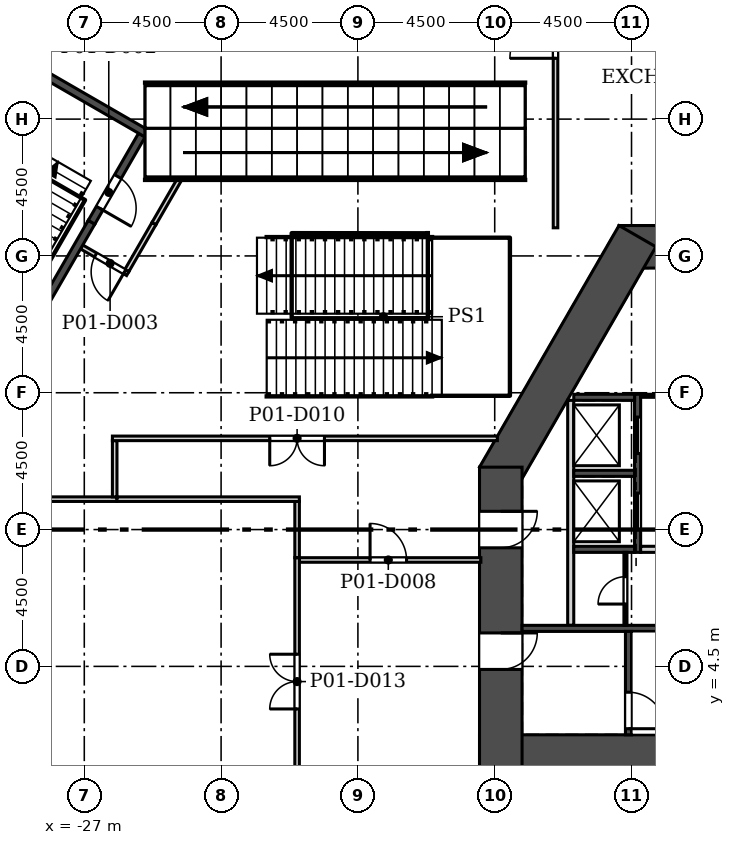
"""IFC4 building model, lengths in metres.
Left out: names, types, materials, properties, quantities, classifications, styles, units other than length and angle.
Written with IfcOpenShell. Run it as: python <this file> out.ifc"""

import sys

from ifc_helpers import new_model, si_unit, direction, frame, frame_2d, origin, place, context, subcontext, project, spatial, rectangle, extrude, element, fill, save


model = new_model("IFC4")
c1 = context("Model", 3, precision=1e-05, world=origin(), true_north=direction((0.0, 1.0)))
c2 = subcontext(c1, "Body", "Model", "MODEL_VIEW")
j1 = project(units=[si_unit("LENGTHUNIT", "METRE"), si_unit("PLANEANGLEUNIT", "RADIAN")], contexts=[c1])
p1 = place(None, origin())
s1 = spatial("IfcSite", under=j1, at=p1, CompositionType="ELEMENT")
p2 = place(p1, origin())
s2 = spatial("IfcBuilding", under=s1, at=p2, CompositionType="ELEMENT")
p3 = place(p2, frame((0.0, 0.0, 8.0)))
s3 = spatial("IfcBuildingStorey", under=s2, at=p3, CompositionType="ELEMENT", Elevation=8.0)
p4 = place(p3, frame((-14.0, 1.55, 0.0), z_axis=(0.0, 0.0, 1.0), x_axis=(1.0, 0.0, 0.0)))
e1 = element("IfcWall", 1, at=p4, inside=s3, PredefinedType="SHEAR", context=c2, shape_type="SweptSolid", body=[
    extrude(rectangle(XDim=28.0, YDim=1.4, at=frame_2d((14.0, 0.0))), origin(), (0.0, 0.0, 1.0), 6.0),
])
p5 = place(p3, frame((9.412, 18.3, 0.0), z_axis=(0.0, 0.0, 1.0), x_axis=(-1.0, 0.0, 0.0)))
e2 = element("IfcWall", 2, at=p5, inside=s3, PredefinedType="SHEAR", context=c2, shape_type="SweptSolid", body=[
    extrude(rectangle(XDim=18.823, YDim=1.4, at=frame_2d((9.412, 0.0))), origin(), (0.0, 0.0, 1.0), 6.0),
])
p6 = place(p5, frame((8.711, 0.0, 0.0)))
e3 = element("IfcOpeningElement", 3, at=p6, cuts=e2, PredefinedType="OPENING", context=c2, shape_type="SweptSolid", body=[
    extrude(rectangle(XDim=1.4, YDim=2.1, at=frame_2d((0.7, 1.05))), frame((0.0, 0.71, 0.0), z_axis=(0.0, -1.0, 0.0), x_axis=(1.0, 0.0, 0.0)), (0.0, 0.0, 1.0), 1.42),
])
p7 = place(p5, frame((11.412, 0.0, 0.0)))
e4 = element("IfcOpeningElement", 4, at=p7, cuts=e2, PredefinedType="OPENING", context=c2, shape_type="SweptSolid", body=[
    extrude(rectangle(XDim=6.0, YDim=2.4, at=frame_2d((3.0, 1.2))), frame((0.0, 0.71, 0.0), z_axis=(0.0, -1.0, 0.0), x_axis=(1.0, 0.0, 0.0)), (0.0, 0.0, 1.0), 1.42),
])
p8 = place(p5, frame((1.412, 0.0, 0.0)))
e5 = element("IfcOpeningElement", 5, at=p8, cuts=e2, PredefinedType="OPENING", context=c2, shape_type="SweptSolid", body=[
    extrude(rectangle(XDim=6.0, YDim=2.4, at=frame_2d((3.0, 1.2))), frame((0.0, 0.71, 0.0), z_axis=(0.0, -1.0, 0.0), x_axis=(1.0, 0.0, 0.0)), (0.0, 0.0, 1.0), 1.42),
])
p9 = place(p3, frame((-8.805, 18.65, 0.0), z_axis=(0.0, 0.0, 1.0), x_axis=(-0.50000187635, -0.866024320471, 0.0)))
e6 = element("IfcWall", 6, at=p9, inside=s3, PredefinedType="SHEAR", context=c2, shape_type="SweptSolid", body=[
    extrude(rectangle(XDim=9.177, YDim=1.4, at=frame_2d((4.588, 0.0))), origin(), (0.0, 0.0, 1.0), 6.0),
])
p10 = place(p3, frame((-13.3, 11.052, 0.0), z_axis=(0.0, 0.0, 1.0), x_axis=(0.0, -1.0, 0.0)))
e7 = element("IfcWall", 7, at=p10, inside=s3, PredefinedType="SHEAR", context=c2, shape_type="SweptSolid", body=[
    extrude(rectangle(XDim=10.202, YDim=1.4, at=frame_2d((5.101, 0.0))), origin(), (0.0, 0.0, 1.0), 6.0),
])
p11 = place(p10, frame((5.453, 0.0, 0.0)))
e8 = element("IfcOpeningElement", 8, at=p11, cuts=e7, PredefinedType="OPENING", context=c2, shape_type="SweptSolid", body=[
    extrude(rectangle(XDim=1.2, YDim=2.1, at=frame_2d((0.6, 1.05))), frame((0.0, 0.71, 0.0), z_axis=(0.0, -1.0, 0.0), x_axis=(1.0, 0.0, 0.0)), (0.0, 0.0, 1.0), 1.42),
])
p12 = place(p10, frame((1.453, 0.0, 0.0)))
e9 = element("IfcOpeningElement", 9, at=p12, cuts=e7, PredefinedType="OPENING", context=c2, shape_type="SweptSolid", body=[
    extrude(rectangle(XDim=1.2, YDim=2.1, at=frame_2d((0.6, 1.05))), frame((0.0, 0.71, 0.0), z_axis=(0.0, -1.0, 0.0), x_axis=(1.0, 0.0, 0.0)), (0.0, 0.0, 1.0), 1.42),
])
p13 = place(p3, frame((-11.0, 5.85, 0.0), z_axis=(0.0, 0.0, 1.0), x_axis=(0.0, 1.0, 0.0)))
e10 = element("IfcWall", 10, at=p13, inside=s3, PredefinedType="SOLIDWALL", context=c2, shape_type="SweptSolid", body=[
    extrude(rectangle(XDim=7.4, YDim=0.2, at=frame_2d((3.7, 0.0))), origin(), (0.0, 0.0, 1.0), 5.7),
])
p14 = place(p3, frame((-8.8, 8.25, -0.3), z_axis=(0.0, 0.0, 1.0), x_axis=(0.0, 1.0, 0.0)))
e11 = element("IfcWall", 11, at=p14, inside=s3, PredefinedType="SOLIDWALL", context=c2, shape_type="SweptSolid", body=[
    extrude(rectangle(XDim=5.2, YDim=0.2, at=frame_2d((2.6, 0.0))), origin(), (0.0, 0.0, 1.0), 6.0),
])
p15 = place(p14, frame((0.75, 0.0, 0.3)))
e12 = element("IfcOpeningElement", 12, at=p15, cuts=e11, PredefinedType="OPENING", context=c2, shape_type="SweptSolid", body=[
    extrude(rectangle(XDim=1.2, YDim=2.1, at=frame_2d((0.6, 1.05))), frame((0.0, 0.11, 0.0), z_axis=(0.0, -1.0, 0.0), x_axis=(1.0, 0.0, 0.0)), (0.0, 0.0, 1.0), 0.22),
])
p16 = place(p14, frame((3.25, 0.0, 0.3)))
e13 = element("IfcOpeningElement", 13, at=p16, cuts=e11, PredefinedType="OPENING", context=c2, shape_type="SweptSolid", body=[
    extrude(rectangle(XDim=1.2, YDim=2.1, at=frame_2d((0.6, 1.05))), frame((0.0, 0.11, 0.0), z_axis=(0.0, -1.0, 0.0), x_axis=(1.0, 0.0, 0.0)), (0.0, 0.0, 1.0), 0.22),
])
p17 = place(p3, frame((-10.9, 8.35, -0.3), z_axis=(0.0, 0.0, 1.0), x_axis=(1.0, 0.0, 0.0)))
e14 = element("IfcWall", 14, at=p17, inside=s3, PredefinedType="SOLIDWALL", context=c2, shape_type="SweptSolid", body=[
    extrude(rectangle(XDim=2.0, YDim=0.2, at=frame_2d((1.0, 0.0))), origin(), (0.0, 0.0, 1.0), 6.0),
])
p18 = place(p3, frame((-12.6, 5.75, -0.3), z_axis=(0.0, 0.0, 1.0), x_axis=(1.0, 0.0, 0.0)))
e15 = element("IfcWall", 15, at=p18, inside=s3, PredefinedType="SOLIDWALL", context=c2, shape_type="SweptSolid", body=[
    extrude(rectangle(XDim=11.4, YDim=0.2, at=frame_2d((5.7, 0.0))), origin(), (0.0, 0.0, 1.0), 6.0),
])
p19 = place(p3, frame((-9.1, 2.25, -0.3), z_axis=(0.0, 0.0, 1.0), x_axis=(0.0, 1.0, 0.0)))
e16 = element("IfcWall", 16, at=p19, inside=s3, PredefinedType="SOLIDWALL", context=c2, shape_type="SweptSolid", body=[
    extrude(rectangle(XDim=3.4, YDim=0.2, at=frame_2d((1.7, 0.0))), origin(), (0.0, 0.0, 1.0), 6.0),
])
p20 = place(p19, frame((0.2, 0.0, 0.3)))
e17 = element("IfcOpeningElement", 17, at=p20, cuts=e16, PredefinedType="OPENING", context=c2, shape_type="SweptSolid", body=[
    extrude(rectangle(XDim=1.2, YDim=2.1, at=frame_2d((0.6, 1.05))), frame((0.0, 0.11, 0.0), z_axis=(0.0, -1.0, 0.0), x_axis=(1.0, 0.0, 0.0)), (0.0, 0.0, 1.0), 0.22),
])
for number, where, z_axis, x_axis in (
    (18, (-10.9, 10.85, -0.3), (0.0, 0.0, 1.0), (1.0, 0.0, 0.0)),
    (19, (-10.9, 13.35, -0.3), (0.0, 0.0, 1.0), (1.0, 0.0, 0.0)),
):
    element("IfcWall", number, at=place(p3, frame(where, z_axis=z_axis, x_axis=x_axis)), inside=s3, PredefinedType="SOLIDWALL", context=c2, shape_type="SweptSolid", body=[
        extrude(rectangle(XDim=2.0, YDim=0.2, at=frame_2d((1.0, 0.0))), origin(), (0.0, 0.0, 1.0), 6.0),
    ])
p21 = place(p3, frame((-8.7, 13.4, 0.0), z_axis=(0.0, 0.0, 1.0), x_axis=(1.0, 0.0, 0.0)))
e20 = element("IfcWall", 20, at=p21, inside=s3, PredefinedType="PARTITIONING", context=c2, shape_type="SweptSolid", body=[
    extrude(rectangle(XDim=2.8, YDim=0.1, at=frame_2d((1.4, 0.0))), origin(), (0.0, 0.0, 1.0), 5.7),
])
p22 = place(p21, frame((0.7, 0.0, 0.0)))
e21 = element("IfcOpeningElement", 21, at=p22, cuts=e20, PredefinedType="OPENING", context=c2, shape_type="SweptSolid", body=[
    extrude(rectangle(XDim=1.4, YDim=2.1, at=frame_2d((0.7, 1.05))), frame((0.0, 0.06, 0.0), z_axis=(0.0, -1.0, 0.0), x_axis=(1.0, 0.0, 0.0)), (0.0, 0.0, 1.0), 0.12),
])
p23 = place(p3, frame((-9.2, 5.85, 0.0), z_axis=(0.0, 0.0, 1.0), x_axis=(0.0, 1.0, 0.0)))
e22 = element("IfcWall", 22, at=p23, inside=s3, PredefinedType="PARTITIONING", context=c2, shape_type="SweptSolid", body=[
    extrude(rectangle(XDim=2.4, YDim=0.1, at=frame_2d((1.2, 0.0))), origin(), (0.0, 0.0, 1.0), 5.7),
])
p24 = place(p23, frame((0.7, 0.0, 0.0)))
e23 = element("IfcOpeningElement", 23, at=p24, cuts=e22, PredefinedType="OPENING", context=c2, shape_type="SweptSolid", body=[
    extrude(rectangle(XDim=0.9, YDim=2.1, at=frame_2d((0.45, 1.05))), frame((0.0, 0.06, 0.0), z_axis=(0.0, -1.0, 0.0), x_axis=(1.0, 0.0, 0.0)), (0.0, 0.0, 1.0), 0.12),
])
p25 = place(p3, frame((-8.7, 8.35, 0.0), z_axis=(0.0, 0.0, 1.0), x_axis=(1.0, 0.0, 0.0)))
e24 = element("IfcWall", 24, at=p25, inside=s3, PredefinedType="SOLIDWALL", context=c2, shape_type="SweptSolid", body=[
    extrude(rectangle(XDim=2.8, YDim=0.2, at=frame_2d((1.4, 0.0))), origin(), (0.0, 0.0, 1.0), 5.7),
])
p26 = place(p25, frame((0.9, 0.0, 0.0)))
e25 = element("IfcOpeningElement", 25, at=p26, cuts=e24, PredefinedType="OPENING", context=c2, shape_type="SweptSolid", body=[
    extrude(rectangle(XDim=1.0, YDim=2.1, at=frame_2d((0.5, 1.05))), frame((0.0, 0.11, 0.0), z_axis=(0.0, -1.0, 0.0), x_axis=(1.0, 0.0, 0.0)), (0.0, 0.0, 1.0), 0.22),
])
p27 = place(p3, frame((-19.925, 8.0, 0.0), z_axis=(0.0, 0.0, 1.0), x_axis=(1.0, 0.0, 0.0)))
e26 = element("IfcWall", 26, at=p27, inside=s3, PredefinedType="PARTITIONING", context=c2, shape_type="SweptSolid", body=[
    extrude(rectangle(XDim=5.97, YDim=0.15, at=frame_2d((2.985, 0.0))), origin(), (0.0, 0.0, 1.0), 5.7),
])
p28 = place(p27, frame((2.325, 0.0, 0.0)))
e27 = element("IfcOpeningElement", 27, at=p28, cuts=e26, PredefinedType="OPENING", context=c2, shape_type="SweptSolid", body=[
    extrude(rectangle(XDim=1.2, YDim=2.1, at=frame_2d((0.6, 1.05))), frame((0.0, 0.085, 0.0), z_axis=(0.0, -1.0, 0.0), x_axis=(1.0, 0.0, 0.0)), (0.0, 0.0, 1.0), 0.17),
])
p29 = place(p3, frame((-20.0, 8.075, 0.0), z_axis=(0.0, 0.0, 1.0), x_axis=(0.0, -1.0, 0.0)))
e28 = element("IfcWall", 28, at=p29, inside=s3, PredefinedType="PARTITIONING", context=c2, shape_type="SweptSolid", body=[
    extrude(rectangle(XDim=7.78, YDim=0.15, at=frame_2d((3.89, 0.0))), origin(), (0.0, 0.0, 1.0), 5.7),
])
p30 = place(p29, frame((3.175, 0.0, 0.0)))
e29 = element("IfcOpeningElement", 29, at=p30, cuts=e28, PredefinedType="OPENING", context=c2, shape_type="SweptSolid", body=[
    extrude(rectangle(XDim=1.8, YDim=2.1, at=frame_2d((0.9, 1.05))), frame((0.0, 0.085, 0.0), z_axis=(0.0, -1.0, 0.0), x_axis=(1.0, 0.0, 0.0)), (0.0, 0.0, 1.0), 0.17),
])
p31 = place(p3, frame((-20.0, 9.925, 0.0), z_axis=(0.0, 0.0, 1.0), x_axis=(0.0, -1.0, 0.0)))
e30 = element("IfcWall", 30, at=p31, inside=s3, PredefinedType="PARTITIONING", context=c2, shape_type="SweptSolid", body=[
    extrude(rectangle(XDim=1.85, YDim=0.15, at=frame_2d((0.925, 0.0))), origin(), (0.0, 0.0, 1.0), 5.7),
])
p32 = place(p3, frame((-41.944, 10.0, 0.0), z_axis=(0.0, 0.0, 1.0), x_axis=(1.0, 0.0, 0.0)))
e31 = element("IfcWall", 31, at=p32, inside=s3, PredefinedType="PARTITIONING", context=c2, shape_type="SweptSolid", body=[
    extrude(rectangle(XDim=16.019, YDim=0.15, at=frame_2d((8.009, 0.0))), origin(), (0.0, 0.0, 1.0), 5.7),
])
p33 = place(p32, frame((3.044, 0.0, 0.0)))
e32 = element("IfcOpeningElement", 32, at=p33, cuts=e31, PredefinedType="OPENING", context=c2, shape_type="SweptSolid", body=[
    extrude(rectangle(XDim=1.8, YDim=2.1, at=frame_2d((0.9, 1.05))), frame((0.0, 0.085, 0.0), z_axis=(0.0, -1.0, 0.0), x_axis=(1.0, 0.0, 0.0)), (0.0, 0.0, 1.0), 0.17),
])
p34 = place(p3, frame((-25.925, 10.0, 0.0), z_axis=(0.0, 0.0, 1.0), x_axis=(1.0, 0.0, 0.0)))
e33 = element("IfcWall", 33, at=p34, inside=s3, PredefinedType="PARTITIONING", context=c2, shape_type="SweptSolid", body=[
    extrude(rectangle(XDim=6.0, YDim=0.15, at=frame_2d((3.0, 0.0))), origin(), (0.0, 0.0, 1.0), 5.7),
])
p35 = place(p3, frame((-26.0, 10.075, 0.0), z_axis=(0.0, 0.0, 1.0), x_axis=(0.0, 1.0, 0.0)))
e34 = element("IfcWall", 34, at=p35, inside=s3, PredefinedType="PARTITIONING", context=c2, shape_type="SweptSolid", body=[
    extrude(rectangle(XDim=1.85, YDim=0.15, at=frame_2d((0.925, 0.0))), origin(), (0.0, 0.0, 1.0), 5.7),
])
p36 = place(p3, frame((-26.075, 12.0, 0.0), z_axis=(0.0, 0.0, 1.0), x_axis=(1.0, 0.0, 0.0)))
e35 = element("IfcWall", 35, at=p36, inside=s3, PredefinedType="PARTITIONING", context=c2, shape_type="SweptSolid", body=[
    extrude(rectangle(XDim=12.662, YDim=0.15, at=frame_2d((6.331, 0.0))), origin(), (0.0, 0.0, 1.0), 5.7),
])
p37 = place(p36, frame((5.175, 0.0, 0.0)))
e36 = element("IfcOpeningElement", 36, at=p37, cuts=e35, PredefinedType="OPENING", context=c2, shape_type="SweptSolid", body=[
    extrude(rectangle(XDim=1.8, YDim=2.1, at=frame_2d((0.9, 1.05))), frame((0.0, 0.085, 0.0), z_axis=(0.0, -1.0, 0.0), x_axis=(1.0, 0.0, 0.0)), (0.0, 0.0, 1.0), 0.17),
])
p38 = place(p3, frame((-25.571, 17.419, 0.0), z_axis=(0.0, 0.0, 1.0), x_axis=(-0.866046247233, 0.49996389635, 0.0)))
e37 = element("IfcWall", 37, at=p38, inside=s3, PredefinedType="PARTITIONING", context=c2, shape_type="SweptSolid", body=[
    extrude(rectangle(XDim=1.751, YDim=0.15, at=frame_2d((0.875, 0.0))), origin(), (0.0, 0.0, 1.0), 5.7),
])
p39 = place(p38, frame((0.12, 0.0, 0.0)))
e38 = element("IfcOpeningElement", 38, at=p39, cuts=e37, PredefinedType="OPENING", context=c2, shape_type="SweptSolid", body=[
    extrude(rectangle(XDim=1.1, YDim=2.1, at=frame_2d((0.55, 1.05))), frame((0.0, 0.085, 0.0), z_axis=(0.0, -1.0, 0.0), x_axis=(1.0, 0.0, 0.0)), (0.0, 0.0, 1.0), 0.17),
])
p40 = place(p3, frame((-24.707, 19.065, 0.0), z_axis=(0.0, 0.0, 1.0), x_axis=(-0.500058459303, -0.865991649659, 0.0)))
e39 = element("IfcWall", 39, at=p40, inside=s3, PredefinedType="PARTITIONING", context=c2, shape_type="SweptSolid", body=[
    extrude(rectangle(XDim=1.782, YDim=0.15, at=frame_2d((0.891, 0.0))), origin(), (0.0, 0.0, 1.0), 5.7),
])
p41 = place(p3, frame((-26.761, 19.108, 0.0), z_axis=(0.0, 0.0, 1.0), x_axis=(-0.499979843709, -0.866037040711, 0.0)))
e40 = element("IfcWall", 40, at=p41, inside=s3, PredefinedType="SOLIDWALL", context=c2, shape_type="SweptSolid", body=[
    extrude(rectangle(XDim=8.293, YDim=0.25, at=frame_2d((4.146, 0.0))), origin(), (0.0, 0.0, 1.0), 5.7),
])
p42 = place(p3, frame((-23.841, 20.565, 0.0), z_axis=(0.0, 0.0, 1.0), x_axis=(-0.500019299785, -0.866014260761, 0.0)))
e41 = element("IfcWall", 41, at=p42, inside=s3, PredefinedType="PARTITIONING", context=c2, shape_type="SweptSolid", body=[
    extrude(rectangle(XDim=1.732, YDim=0.15, at=frame_2d((0.866, 0.0))), origin(), (0.0, 0.0, 1.0), 5.7),
])
p43 = place(p3, frame((-25.107, 21.972, 0.0), z_axis=(0.0, 0.0, 1.0), x_axis=(-0.500005757777, -0.866022079505, 0.0)))
e42 = element("IfcWall", 42, at=p43, inside=s3, PredefinedType="SOLIDWALL", context=c2, shape_type="SweptSolid", body=[
    extrude(rectangle(XDim=3.307, YDim=0.25, at=frame_2d((1.654, 0.0))), origin(), (0.0, 0.0, 1.0), 5.7),
])
p44 = place(p43, frame((1.575, 0.0, 0.0)))
e43 = element("IfcOpeningElement", 43, at=p44, cuts=e42, PredefinedType="OPENING", context=c2, shape_type="SweptSolid", body=[
    extrude(rectangle(XDim=1.2, YDim=2.1, at=frame_2d((0.6, 1.05))), frame((0.0, 0.135, 0.0), z_axis=(0.0, -1.0, 0.0), x_axis=(1.0, 0.0, 0.0)), (0.0, 0.0, 1.0), 0.27),
])
p45 = place(p3, frame((-30.652, 25.318, 0.0), z_axis=(0.0, 0.0, 1.0), x_axis=(0.866040211805, -0.499974350878, 0.0)))
e44 = element("IfcWall", 44, at=p45, inside=s3, PredefinedType="SOLIDWALL", context=c2, shape_type="SweptSolid", body=[
    extrude(rectangle(XDim=6.6, YDim=0.25, at=frame_2d((3.3, 0.0))), origin(), (0.0, 0.0, 1.0), 5.7),
])
p46 = place(p3, frame((-11.5, 28.835, 0.0), z_axis=(0.0, 0.0, 1.0), x_axis=(0.0, -1.0, 0.0)))
e45 = element("IfcWall", 45, at=p46, inside=s3, PredefinedType="PARTITIONING", context=c2, shape_type="SweptSolid", body=[
    extrude(rectangle(XDim=9.91, YDim=0.15, at=frame_2d((4.955, 0.0))), origin(), (0.0, 0.0, 1.0), 5.7),
])
p47 = place(p46, frame((1.335, 0.0, 0.0)))
e46 = element("IfcOpeningElement", 46, at=p47, cuts=e45, PredefinedType="OPENING", context=c2, shape_type="SweptSolid", body=[
    extrude(rectangle(XDim=3.0, YDim=2.4, at=frame_2d((1.5, 1.2))), frame((0.0, 0.085, 0.0), z_axis=(0.0, -1.0, 0.0), x_axis=(1.0, 0.0, 0.0)), (0.0, 0.0, 1.0), 0.17),
])
p48 = place(p3, frame((-13.125, 13.45, 0.0), z_axis=(0.0, 0.0, 1.0), x_axis=(0.0, 1.0, 0.0)))
e47 = element("IfcWall", 47, at=p48, inside=s3, PredefinedType="SOLIDWALL", context=c2, shape_type="SweptSolid", body=[
    extrude(rectangle(XDim=5.1, YDim=0.25, at=frame_2d((2.55, 0.0))), origin(), (0.0, 0.0, 1.0), 5.7),
])
for number, where, z_axis, x_axis in (
    (48, (-13.125, 13.525, 0.0), (0.0, 0.0, 1.0), (-1.0, 0.0, 0.0)),
    (49, (-13.125, 18.475, 0.0), (0.0, 0.0, 1.0), (-1.0, 0.0, 0.0)),
):
    element("IfcWall", number, at=place(p3, frame(where, z_axis=z_axis, x_axis=x_axis)), inside=s3, PredefinedType="SOLIDWALL", context=c2, shape_type="SweptSolid", body=[
        extrude(rectangle(XDim=2.31, YDim=0.25, at=frame_2d((1.155, 0.0))), origin(), (0.0, 0.0, 1.0), 5.7),
    ])
p49 = place(p15, origin())
e50 = element("IfcDoor", 50, at=p49, inside=s3, OperationType="SLIDING_TO_LEFT", PredefinedType="DOOR", context=c2, shape_type="SweptSolid", body=[
    extrude(rectangle(XDim=1.2, YDim=2.1, at=frame_2d((0.6, 1.05))), frame((0.0, 0.025, 0.0), z_axis=(0.0, -1.0, 0.0), x_axis=(1.0, 0.0, 0.0)), (0.0, 0.0, 1.0), 0.05),
])
fill(e12, e50)
p50 = place(p16, origin())
e51 = element("IfcDoor", 51, at=p50, inside=s3, OperationType="SLIDING_TO_LEFT", PredefinedType="DOOR", context=c2, shape_type="SweptSolid", body=[
    extrude(rectangle(XDim=1.2, YDim=2.1, at=frame_2d((0.6, 1.05))), frame((0.0, 0.025, 0.0), z_axis=(0.0, -1.0, 0.0), x_axis=(1.0, 0.0, 0.0)), (0.0, 0.0, 1.0), 0.05),
])
fill(e13, e51)
p51 = place(p24, origin())
e52 = element("IfcDoor", 52, at=p51, inside=s3, OperationType="SINGLE_SWING_LEFT", PredefinedType="DOOR", context=c2, shape_type="SweptSolid", body=[
    extrude(rectangle(XDim=0.9, YDim=2.1, at=frame_2d((0.45, 1.05))), frame((0.0, 0.025, 0.0), z_axis=(0.0, -1.0, 0.0), x_axis=(1.0, 0.0, 0.0)), (0.0, 0.0, 1.0), 0.05),
])
fill(e23, e52)
p52 = place(p11, origin())
e53 = element("IfcDoor", 53, at=p52, inside=s3, OperationType="SINGLE_SWING_LEFT", PredefinedType="DOOR", context=c2, shape_type="SweptSolid", body=[
    extrude(rectangle(XDim=1.2, YDim=2.1, at=frame_2d((0.6, 1.05))), frame((0.0, 0.025, 0.0), z_axis=(0.0, -1.0, 0.0), x_axis=(1.0, 0.0, 0.0)), (0.0, 0.0, 1.0), 0.05),
])
fill(e8, e53)
p53 = place(p20, frame((1.2, 0.0, 0.0), z_axis=(0.0, 0.0, 1.0), x_axis=(-1.0, 0.0, 0.0)))
e54 = element("IfcDoor", 54, at=p53, inside=s3, OperationType="SINGLE_SWING_RIGHT", PredefinedType="DOOR", context=c2, shape_type="SweptSolid", body=[
    extrude(rectangle(XDim=1.2, YDim=2.1, at=frame_2d((0.6, 1.05))), frame((0.0, 0.025, 0.0), z_axis=(0.0, -1.0, 0.0), x_axis=(1.0, 0.0, 0.0)), (0.0, 0.0, 1.0), 0.05),
])
fill(e17, e54)
p54 = place(p12, origin())
e55 = element("IfcDoor", 55, at=p54, inside=s3, OperationType="SINGLE_SWING_LEFT", PredefinedType="DOOR", context=c2, shape_type="SweptSolid", body=[
    extrude(rectangle(XDim=1.2, YDim=2.1, at=frame_2d((0.6, 1.05))), frame((0.0, 0.025, 0.0), z_axis=(0.0, -1.0, 0.0), x_axis=(1.0, 0.0, 0.0)), (0.0, 0.0, 1.0), 0.05),
])
fill(e9, e55)
p55 = place(p44, origin())
e56 = element("IfcDoor", 56, at=p55, inside=s3, OperationType="SINGLE_SWING_RIGHT", PredefinedType="DOOR", context=c2, shape_type="SweptSolid", body=[
    extrude(rectangle(XDim=1.2, YDim=2.1, at=frame_2d((0.6, 1.05))), frame((0.0, 0.025, 0.0), z_axis=(0.0, -1.0, 0.0), x_axis=(1.0, 0.0, 0.0)), (0.0, 0.0, 1.0), 0.05),
])
fill(e43, e56)
p56 = place(p39, origin())
e57 = element("IfcDoor", 57, at=p56, inside=s3, OperationType="SINGLE_SWING_LEFT", PredefinedType="DOOR", context=c2, shape_type="SweptSolid", body=[
    extrude(rectangle(XDim=1.1, YDim=2.1, at=frame_2d((0.55, 1.05))), frame((0.0, 0.025, 0.0), z_axis=(0.0, -1.0, 0.0), x_axis=(1.0, 0.0, 0.0)), (0.0, 0.0, 1.0), 0.05),
])
fill(e38, e57)
p57 = place(p28, origin())
e58 = element("IfcDoor", 58, at=p57, inside=s3, OperationType="SINGLE_SWING_LEFT", PredefinedType="DOOR", context=c2, shape_type="SweptSolid", body=[
    extrude(rectangle(XDim=1.2, YDim=2.1, at=frame_2d((0.6, 1.05))), frame((0.0, 0.025, 0.0), z_axis=(0.0, -1.0, 0.0), x_axis=(1.0, 0.0, 0.0)), (0.0, 0.0, 1.0), 0.05),
])
fill(e27, e58)
p58 = place(p37, frame((1.8, 0.0, 0.0), z_axis=(0.0, 0.0, 1.0), x_axis=(-1.0, 0.0, 0.0)))
e59 = element("IfcDoor", 59, at=p58, inside=s3, OperationType="DOUBLE_DOOR_SINGLE_SWING", PredefinedType="DOOR", context=c2, shape_type="SweptSolid", body=[
    extrude(rectangle(XDim=1.8, YDim=2.1, at=frame_2d((0.9, 1.05))), frame((0.0, 0.025, 0.0), z_axis=(0.0, -1.0, 0.0), x_axis=(1.0, 0.0, 0.0)), (0.0, 0.0, 1.0), 0.05),
])
fill(e36, e59)
p59 = place(p30, frame((1.8, 0.0, 0.0), z_axis=(0.0, 0.0, 1.0), x_axis=(-1.0, 0.0, 0.0)))
e60 = element("IfcDoor", 60, at=p59, inside=s3, OperationType="DOUBLE_DOOR_SINGLE_SWING", PredefinedType="DOOR", context=c2, shape_type="SweptSolid", body=[
    extrude(rectangle(XDim=1.8, YDim=2.1, at=frame_2d((0.9, 1.05))), frame((0.0, 0.025, 0.0), z_axis=(0.0, -1.0, 0.0), x_axis=(1.0, 0.0, 0.0)), (0.0, 0.0, 1.0), 0.05),
])
fill(e29, e60)
p60 = place(p47, frame((3.0, 0.0, 0.0), z_axis=(0.0, 0.0, 1.0), x_axis=(-1.0, 0.0, 0.0)))
e61 = element("IfcDoor", 61, at=p60, inside=s3, OperationType="DOUBLE_DOOR_SINGLE_SWING", PredefinedType="DOOR", context=c2, shape_type="SweptSolid", body=[
    extrude(rectangle(XDim=3.0, YDim=2.4, at=frame_2d((1.5, 1.2))), frame((0.0, 0.025, 0.0), z_axis=(0.0, -1.0, 0.0), x_axis=(1.0, 0.0, 0.0)), (0.0, 0.0, 1.0), 0.05),
])
fill(e46, e61)
save(model, sys.argv[1])
